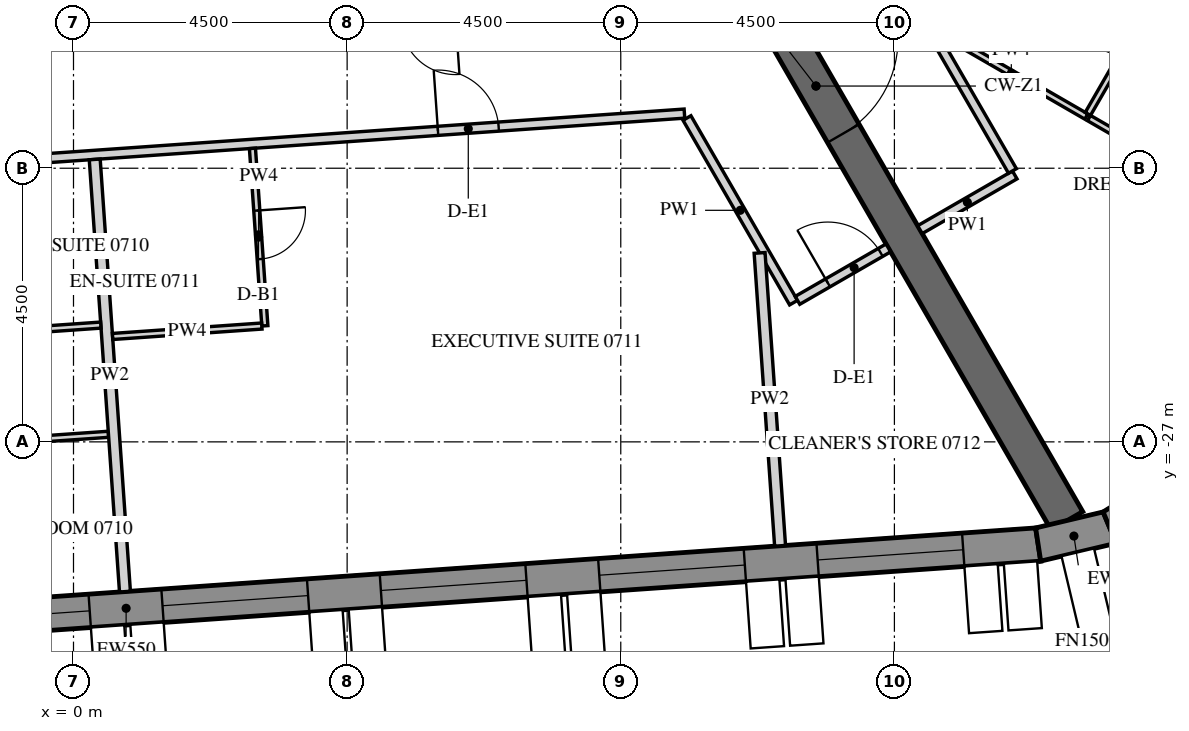
"""IFC4 building model, lengths in metres.
Left out: names, types, materials, properties, quantities, classifications, styles, units other than length and angle.
Written with IfcOpenShell. Run it as: python <this file> out.ifc"""

import sys

from ifc_helpers import new_model, si_unit, direction, frame, frame_2d, origin, place, context, subcontext, project, spatial, polyline, rectangle, outline, extrude, element, fill, save


model = new_model("IFC4")
c1 = context("Model", 3, precision=1e-05, world=origin(), true_north=direction((0.0, 1.0)))
c2 = subcontext(c1, "Body", "Model", "MODEL_VIEW")
j1 = project(units=[si_unit("LENGTHUNIT", "METRE"), si_unit("PLANEANGLEUNIT", "RADIAN")], contexts=[c1])
p1 = place(None, origin())
s1 = spatial("IfcSite", under=j1, at=p1, CompositionType="ELEMENT")
p2 = place(p1, origin())
s2 = spatial("IfcBuilding", under=s1, at=p2, CompositionType="ELEMENT")
p3 = place(p2, frame((0.0, 0.0, 99.9)))
s3 = spatial("IfcBuildingStorey", under=s2, at=p3, CompositionType="ELEMENT", Elevation=99.9)
p4 = place(p3, frame((-14.134, -30.786, -0.15), z_axis=(0.0, 0.0, 1.0), x_axis=(0.997564037441, 0.069756657061, 0.0)))
e1 = element("IfcWall", 1, at=p4, inside=s3, PredefinedType="SOLIDWALL", context=c2, shape_type="SweptSolid", body=[
    extrude(outline(polyline([(-0.026, -0.275), (30.094, -0.275), (30.049, 0.275), (0.026, 0.275), (-0.026, -0.275)])), origin(), (0.0, 0.0, 1.0), 3.9),
])
p5 = place(p4, frame((1.236, 0.0, 1.05)))
e2 = element("IfcOpeningElement", 2, at=p5, cuts=e1, PredefinedType="OPENING", context=c2, shape_type="SweptSolid", body=[
    extrude(rectangle(XDim=2.4, YDim=2.4, at=frame_2d((1.2, 1.2))), frame((0.0, 0.285, 0.0), z_axis=(0.0, -1.0, 0.0), x_axis=(1.0, 0.0, 0.0)), (0.0, 0.0, 1.0), 0.57),
])
p6 = place(p4, frame((4.835, 0.0, 1.05)))
e3 = element("IfcOpeningElement", 3, at=p6, cuts=e1, PredefinedType="OPENING", context=c2, shape_type="SweptSolid", body=[
    extrude(rectangle(XDim=2.4, YDim=2.4, at=frame_2d((1.2, 1.2))), frame((0.0, 0.285, 0.0), z_axis=(0.0, -1.0, 0.0), x_axis=(1.0, 0.0, 0.0)), (0.0, 0.0, 1.0), 0.57),
])
p7 = place(p4, frame((8.436, 0.0, 1.05)))
e4 = element("IfcOpeningElement", 4, at=p7, cuts=e1, PredefinedType="OPENING", context=c2, shape_type="SweptSolid", body=[
    extrude(rectangle(XDim=2.4, YDim=2.4, at=frame_2d((1.2, 1.2))), frame((0.0, 0.285, 0.0), z_axis=(0.0, -1.0, 0.0), x_axis=(1.0, 0.0, 0.0)), (0.0, 0.0, 1.0), 0.57),
])
p8 = place(p4, frame((12.035, 0.0, 1.05)))
e5 = element("IfcOpeningElement", 5, at=p8, cuts=e1, PredefinedType="OPENING", context=c2, shape_type="SweptSolid", body=[
    extrude(rectangle(XDim=2.4, YDim=2.4, at=frame_2d((1.2, 1.2))), frame((0.0, 0.285, 0.0), z_axis=(0.0, -1.0, 0.0), x_axis=(1.0, 0.0, 0.0)), (0.0, 0.0, 1.0), 0.57),
])
p9 = place(p4, frame((15.635, 0.0, 1.05)))
e6 = element("IfcOpeningElement", 6, at=p9, cuts=e1, PredefinedType="OPENING", context=c2, shape_type="SweptSolid", body=[
    extrude(rectangle(XDim=2.4, YDim=2.4, at=frame_2d((1.2, 1.2))), frame((0.0, 0.285, 0.0), z_axis=(0.0, -1.0, 0.0), x_axis=(1.0, 0.0, 0.0)), (0.0, 0.0, 1.0), 0.57),
])
p10 = place(p4, frame((19.236, 0.0, 1.05)))
e7 = element("IfcOpeningElement", 7, at=p10, cuts=e1, PredefinedType="OPENING", context=c2, shape_type="SweptSolid", body=[
    extrude(rectangle(XDim=2.4, YDim=2.4, at=frame_2d((1.2, 1.2))), frame((0.0, 0.285, 0.0), z_axis=(0.0, -1.0, 0.0), x_axis=(1.0, 0.0, 0.0)), (0.0, 0.0, 1.0), 0.57),
])
p11 = place(p4, frame((22.835, 0.0, 1.05)))
e8 = element("IfcOpeningElement", 8, at=p11, cuts=e1, PredefinedType="OPENING", context=c2, shape_type="SweptSolid", body=[
    extrude(rectangle(XDim=2.4, YDim=2.4, at=frame_2d((1.2, 1.2))), frame((0.0, 0.285, 0.0), z_axis=(0.0, -1.0, 0.0), x_axis=(1.0, 0.0, 0.0)), (0.0, 0.0, 1.0), 0.57),
])
p12 = place(p4, frame((26.436, 0.0, 1.05)))
e9 = element("IfcOpeningElement", 9, at=p12, cuts=e1, PredefinedType="OPENING", context=c2, shape_type="SweptSolid", body=[
    extrude(rectangle(XDim=2.4, YDim=2.4, at=frame_2d((1.2, 1.2))), frame((0.0, 0.285, 0.0), z_axis=(0.0, -1.0, 0.0), x_axis=(1.0, 0.0, 0.0)), (0.0, 0.0, 1.0), 0.57),
])
p13 = place(p3, frame((15.864, -28.688, -0.15), z_axis=(0.0, 0.0, 1.0), x_axis=(0.973063591128, 0.230536868247, 0.0)))
e10 = element("IfcWall", 10, at=p13, inside=s3, PredefinedType="SOLIDWALL", context=c2, shape_type="SweptSolid", body=[
    extrude(outline(polyline([(-0.022, -0.275), (1.253, -0.275), (1.163, 0.275), (0.022, 0.275), (-0.022, -0.275)])), origin(), (0.0, 0.0, 1.0), 3.9),
])
p14 = place(p3, frame((17.04, -28.41, -0.15), z_axis=(0.0, 0.0, 1.0), x_axis=(0.847952888306, 0.530071598195, 0.0)))
e11 = element("IfcWall", 11, at=p14, inside=s3, PredefinedType="SOLIDWALL", context=c2, shape_type="SweptSolid", body=[
    extrude(outline(polyline([(-0.045, -0.275), (1.253, -0.275), (1.163, 0.275), (0.045, 0.275), (-0.045, -0.275)])), origin(), (0.0, 0.0, 1.0), 3.9),
])
p15 = place(p3, frame((8.083, -14.0, -0.15), z_axis=(0.0, 0.0, 1.0), x_axis=(0.499997680643, -0.866026742862, 0.0)))
e12 = element("IfcWall", 12, at=p15, inside=s3, PredefinedType="SHEAR", context=c2, shape_type="SweptSolid", body=[
    extrude(rectangle(XDim=16.509, YDim=0.6, at=frame_2d((8.254, 0.0))), origin(), (0.0, 0.0, 1.0), 3.9),
])
p16 = place(p15, frame((7.354, 0.0, 0.15)))
e13 = element("IfcOpeningElement", 13, at=p16, cuts=e12, PredefinedType="OPENING", context=c2, shape_type="SweptSolid", body=[
    extrude(rectangle(XDim=1.8, YDim=2.4, at=frame_2d((0.9, 1.2))), frame((0.0, 0.31, 0.0), z_axis=(0.0, -1.0, 0.0), x_axis=(1.0, 0.0, 0.0)), (0.0, 0.0, 1.0), 0.62),
])
p17 = place(p3, frame((-12.234, -23.16, 0.0), z_axis=(0.0, 0.0, 1.0), x_axis=(0.997563845372, 0.069759403714, 0.0)))
e14 = element("IfcWall", 14, at=p17, inside=s3, PredefinedType="PARTITIONING", context=c2, shape_type="SweptSolid", body=[
    extrude(rectangle(XDim=22.335, YDim=0.15, at=frame_2d((11.168, 0.0))), origin(), (0.0, 0.0, 1.0), 2.988),
])
p18 = place(p17, frame((5.409, 0.0, 0.0)))
e15 = element("IfcOpeningElement", 15, at=p18, cuts=e14, PredefinedType="OPENING", context=c2, shape_type="SweptSolid", body=[
    extrude(rectangle(XDim=1.0, YDim=2.1, at=frame_2d((0.5, 1.05))), frame((0.0, 0.085, 0.0), z_axis=(0.0, -1.0, 0.0), x_axis=(1.0, 0.0, 0.0)), (0.0, 0.0, 1.0), 0.17),
])
p19 = place(p17, frame((18.272, 0.0, 0.0)))
e16 = element("IfcOpeningElement", 16, at=p19, cuts=e14, PredefinedType="OPENING", context=c2, shape_type="SweptSolid", body=[
    extrude(rectangle(XDim=1.0, YDim=2.1, at=frame_2d((0.5, 1.05))), frame((0.0, 0.085, 0.0), z_axis=(0.0, -1.0, 0.0), x_axis=(1.0, 0.0, 0.0)), (0.0, 0.0, 1.0), 0.17),
])
p20 = place(p3, frame((10.089, -21.674, 0.0), z_axis=(0.0, 0.0, 1.0), x_axis=(0.500003763204, -0.866023231087, 0.0)))
e17 = element("IfcWall", 17, at=p20, inside=s3, PredefinedType="PARTITIONING", context=c2, shape_type="SweptSolid", body=[
    extrude(rectangle(XDim=3.506, YDim=0.15, at=frame_2d((1.753, 0.0))), origin(), (0.0, 0.0, 1.0), 2.988),
])
p21 = place(p3, frame((11.906, -24.673, 0.0), z_axis=(0.0, 0.0, 1.0), x_axis=(0.866013532718, 0.500020560727, 0.0)))
e18 = element("IfcWall", 18, at=p21, inside=s3, PredefinedType="PARTITIONING", context=c2, shape_type="SweptSolid", body=[
    extrude(rectangle(XDim=1.725, YDim=0.15, at=frame_2d((0.863, 0.0))), origin(), (0.0, 0.0, 1.0), 2.988),
])
p22 = place(p21, frame((0.575, 0.0, 0.0)))
e19 = element("IfcOpeningElement", 19, at=p22, cuts=e18, PredefinedType="OPENING", context=c2, shape_type="SweptSolid", body=[
    extrude(rectangle(XDim=1.0, YDim=2.1, at=frame_2d((0.5, 1.05))), frame((0.0, 0.085, 0.0), z_axis=(0.0, -1.0, 0.0), x_axis=(1.0, 0.0, 0.0)), (0.0, 0.0, 1.0), 0.17),
])
p23 = place(p3, frame((13.92, -23.51, 0.0), z_axis=(0.0, 0.0, 1.0), x_axis=(0.866047807691, 0.499961193289, 0.0)))
e20 = element("IfcWall", 20, at=p23, inside=s3, PredefinedType="PARTITIONING", context=c2, shape_type="SweptSolid", body=[
    extrude(rectangle(XDim=1.8, YDim=0.15, at=frame_2d((0.9, 0.0))), origin(), (0.0, 0.0, 1.0), 2.988),
])
p24 = place(p3, frame((15.441, -22.545, 0.0), z_axis=(0.0, 0.0, 1.0), x_axis=(-0.499974611044, 0.866040061609, 0.0)))
e21 = element("IfcWall", 21, at=p24, inside=s3, PredefinedType="PARTITIONING", context=c2, shape_type="SweptSolid", body=[
    extrude(rectangle(XDim=2.766, YDim=0.15, at=frame_2d((1.383, 0.0))), origin(), (0.0, 0.0, 1.0), 2.988),
])
p25 = place(p3, frame((0.575, -26.875, 0.0), z_axis=(0.0, 0.0, 1.0), x_axis=(-0.997558425079, -0.069836871022, 0.0)))
e22 = element("IfcWall", 22, at=p25, inside=s3, PredefinedType="PARTITIONING", context=c2, shape_type="SweptSolid", body=[
    extrude(rectangle(XDim=2.51, YDim=0.1, at=frame_2d((1.255, 0.0))), origin(), (0.0, 0.0, 1.0), 2.988),
])
p26 = place(p3, frame((0.846, -29.463, 0.0), z_axis=(0.0, 0.0, 1.0), x_axis=(-0.069764000094, 0.997563523938, 0.0)))
e23 = element("IfcWall", 23, at=p26, inside=s3, PredefinedType="PARTITIONING", context=c2, shape_type="SweptSolid", body=[
    extrude(rectangle(XDim=7.125, YDim=0.18, at=frame_2d((3.562, 0.0))), origin(), (0.0, 0.0, 1.0), 2.988),
])
p27 = place(p3, frame((-2.005, -25.251, 0.0), z_axis=(0.0, 0.0, 1.0), x_axis=(0.997570291305, 0.069667165191, 0.0)))
e24 = element("IfcWall", 24, at=p27, inside=s3, PredefinedType="PARTITIONING", context=c2, shape_type="SweptSolid", body=[
    extrude(rectangle(XDim=2.46, YDim=0.1, at=frame_2d((1.23, 0.0))), origin(), (0.0, 0.0, 1.0), 2.988),
])
p28 = place(p3, frame((2.943, -22.174, 0.0), z_axis=(0.0, 0.0, 1.0), x_axis=(0.069781781132, -0.997562280272, 0.0)))
e25 = element("IfcWall", 25, at=p28, inside=s3, PredefinedType="PARTITIONING", context=c2, shape_type="SweptSolid", body=[
    extrude(rectangle(XDim=2.925, YDim=0.1, at=frame_2d((1.462, 0.0))), origin(), (0.0, 0.0, 1.0), 2.988),
])
p29 = place(p28, frame((1.025, 0.0, 0.0)))
e26 = element("IfcOpeningElement", 26, at=p29, cuts=e25, PredefinedType="OPENING", context=c2, shape_type="SweptSolid", body=[
    extrude(rectangle(XDim=0.8, YDim=2.1, at=frame_2d((0.4, 1.05))), frame((0.0, 0.06, 0.0), z_axis=(0.0, -1.0, 0.0), x_axis=(1.0, 0.0, 0.0)), (0.0, 0.0, 1.0), 0.12),
])
p30 = place(p3, frame((3.097, -25.095, 0.0), z_axis=(0.0, 0.0, 1.0), x_axis=(-0.997562906323, -0.069772830877, 0.0)))
e27 = element("IfcWall", 27, at=p30, inside=s3, PredefinedType="PARTITIONING", context=c2, shape_type="SweptSolid", body=[
    extrude(rectangle(XDim=2.46, YDim=0.1, at=frame_2d((1.23, 0.0))), origin(), (0.0, 0.0, 1.0), 2.988),
])
p31 = place(p3, frame((11.62, -28.709, 0.0), z_axis=(0.0, 0.0, 1.0), x_axis=(-0.069777301394, 0.99756259363, 0.0)))
e28 = element("IfcWall", 28, at=p31, inside=s3, PredefinedType="PARTITIONING", context=c2, shape_type="SweptSolid", body=[
    extrude(rectangle(XDim=4.828, YDim=0.18, at=frame_2d((2.414, 0.0))), origin(), (0.0, 0.0, 1.0), 2.988),
])
p32 = place(p3, frame((16.656, -21.65, 0.0), z_axis=(0.0, 0.0, 1.0), x_axis=(-0.866041498374, 0.499972122318, 0.0)))
e29 = element("IfcWall", 29, at=p32, inside=s3, PredefinedType="PARTITIONING", context=c2, shape_type="SweptSolid", body=[
    extrude(rectangle(XDim=2.85, YDim=0.1, at=frame_2d((1.425, 0.0))), origin(), (0.0, 0.0, 1.0), 2.988),
])
p33 = place(p3, frame((18.172, -22.525, 0.0), z_axis=(0.0, 0.0, 1.0), x_axis=(-0.86605165483, 0.499954529098, 0.0)))
e30 = element("IfcWall", 30, at=p33, inside=s3, PredefinedType="PARTITIONING", context=c2, shape_type="SweptSolid", body=[
    extrude(rectangle(XDim=1.7, YDim=0.1, at=frame_2d((0.85, 0.0))), origin(), (0.0, 0.0, 1.0), 2.988),
])
p34 = place(p3, frame((16.682, -21.607, 0.0), z_axis=(0.0, 0.0, 1.0), x_axis=(0.500004234368, 0.866022959057, 0.0)))
e31 = element("IfcWall", 31, at=p34, inside=s3, PredefinedType="PARTITIONING", context=c2, shape_type="SweptSolid", body=[
    extrude(rectangle(XDim=2.5, YDim=0.1, at=frame_2d((1.25, 0.0))), origin(), (0.0, 0.0, 1.0), 2.988),
])
p35 = place(p8, frame((0.0, 0.205, 0.0)))
e32 = element("IfcWindow", 32, at=p35, inside=s3, PartitioningType="DOUBLE_PANEL_VERTICAL", PredefinedType="WINDOW", context=c2, shape_type="SweptSolid", body=[
    extrude(rectangle(XDim=2.4, YDim=2.4, at=frame_2d((1.2, 1.2))), frame((0.0, 0.03, 0.0), z_axis=(0.0, -1.0, 0.0), x_axis=(1.0, 0.0, 0.0)), (0.0, 0.0, 1.0), 0.06),
])
fill(e5, e32)
p36 = place(p9, frame((0.0, 0.205, 0.0)))
e33 = element("IfcWindow", 33, at=p36, inside=s3, PartitioningType="DOUBLE_PANEL_VERTICAL", PredefinedType="WINDOW", context=c2, shape_type="SweptSolid", body=[
    extrude(rectangle(XDim=2.4, YDim=2.4, at=frame_2d((1.2, 1.2))), frame((0.0, 0.03, 0.0), z_axis=(0.0, -1.0, 0.0), x_axis=(1.0, 0.0, 0.0)), (0.0, 0.0, 1.0), 0.06),
])
fill(e6, e33)
p37 = place(p10, frame((0.0, 0.205, 0.0)))
e34 = element("IfcWindow", 34, at=p37, inside=s3, PartitioningType="DOUBLE_PANEL_VERTICAL", PredefinedType="WINDOW", context=c2, shape_type="SweptSolid", body=[
    extrude(rectangle(XDim=2.4, YDim=2.4, at=frame_2d((1.2, 1.2))), frame((0.0, 0.03, 0.0), z_axis=(0.0, -1.0, 0.0), x_axis=(1.0, 0.0, 0.0)), (0.0, 0.0, 1.0), 0.06),
])
fill(e7, e34)
p38 = place(p11, frame((0.0, 0.205, 0.0)))
e35 = element("IfcWindow", 35, at=p38, inside=s3, PartitioningType="DOUBLE_PANEL_VERTICAL", PredefinedType="WINDOW", context=c2, shape_type="SweptSolid", body=[
    extrude(rectangle(XDim=2.4, YDim=2.4, at=frame_2d((1.2, 1.2))), frame((0.0, 0.03, 0.0), z_axis=(0.0, -1.0, 0.0), x_axis=(1.0, 0.0, 0.0)), (0.0, 0.0, 1.0), 0.06),
])
fill(e8, e35)
p39 = place(p12, frame((0.0, 0.205, 0.0)))
e36 = element("IfcWindow", 36, at=p39, inside=s3, PartitioningType="DOUBLE_PANEL_VERTICAL", PredefinedType="WINDOW", context=c2, shape_type="SweptSolid", body=[
    extrude(rectangle(XDim=2.4, YDim=2.4, at=frame_2d((1.2, 1.2))), frame((0.0, 0.03, 0.0), z_axis=(0.0, -1.0, 0.0), x_axis=(1.0, 0.0, 0.0)), (0.0, 0.0, 1.0), 0.06),
])
fill(e9, e36)
p40 = place(p16, origin())
e37 = element("IfcDoor", 37, at=p40, inside=s3, OperationType="DOUBLE_DOOR_SINGLE_SWING", PredefinedType="DOOR", context=c2, shape_type="SweptSolid", body=[
    extrude(rectangle(XDim=1.8, YDim=2.4, at=frame_2d((0.9, 1.2))), frame((0.0, 0.025, 0.0), z_axis=(0.0, -1.0, 0.0), x_axis=(1.0, 0.0, 0.0)), (0.0, 0.0, 1.0), 0.05),
])
fill(e13, e37)
p41 = place(p19, origin())
e38 = element("IfcDoor", 38, at=p41, inside=s3, OperationType="SINGLE_SWING_RIGHT", PredefinedType="DOOR", context=c2, shape_type="SweptSolid", body=[
    extrude(rectangle(XDim=1.0, YDim=2.1, at=frame_2d((0.5, 1.05))), frame((0.0, 0.025, 0.0), z_axis=(0.0, -1.0, 0.0), x_axis=(1.0, 0.0, 0.0)), (0.0, 0.0, 1.0), 0.05),
])
fill(e16, e38)
p42 = place(p29, origin())
e39 = element("IfcDoor", 39, at=p42, inside=s3, OperationType="SINGLE_SWING_RIGHT", PredefinedType="DOOR", context=c2, shape_type="SweptSolid", body=[
    extrude(rectangle(XDim=0.8, YDim=2.1, at=frame_2d((0.4, 1.05))), frame((0.0, 0.025, 0.0), z_axis=(0.0, -1.0, 0.0), x_axis=(1.0, 0.0, 0.0)), (0.0, 0.0, 1.0), 0.05),
])
fill(e26, e39)
p43 = place(p22, origin())
e40 = element("IfcDoor", 40, at=p43, inside=s3, OperationType="SINGLE_SWING_LEFT", PredefinedType="DOOR", context=c2, shape_type="SweptSolid", body=[
    extrude(rectangle(XDim=1.0, YDim=2.1, at=frame_2d((0.5, 1.05))), frame((0.0, 0.025, 0.0), z_axis=(0.0, -1.0, 0.0), x_axis=(1.0, 0.0, 0.0)), (0.0, 0.0, 1.0), 0.05),
])
fill(e19, e40)
save(model, sys.argv[1])
